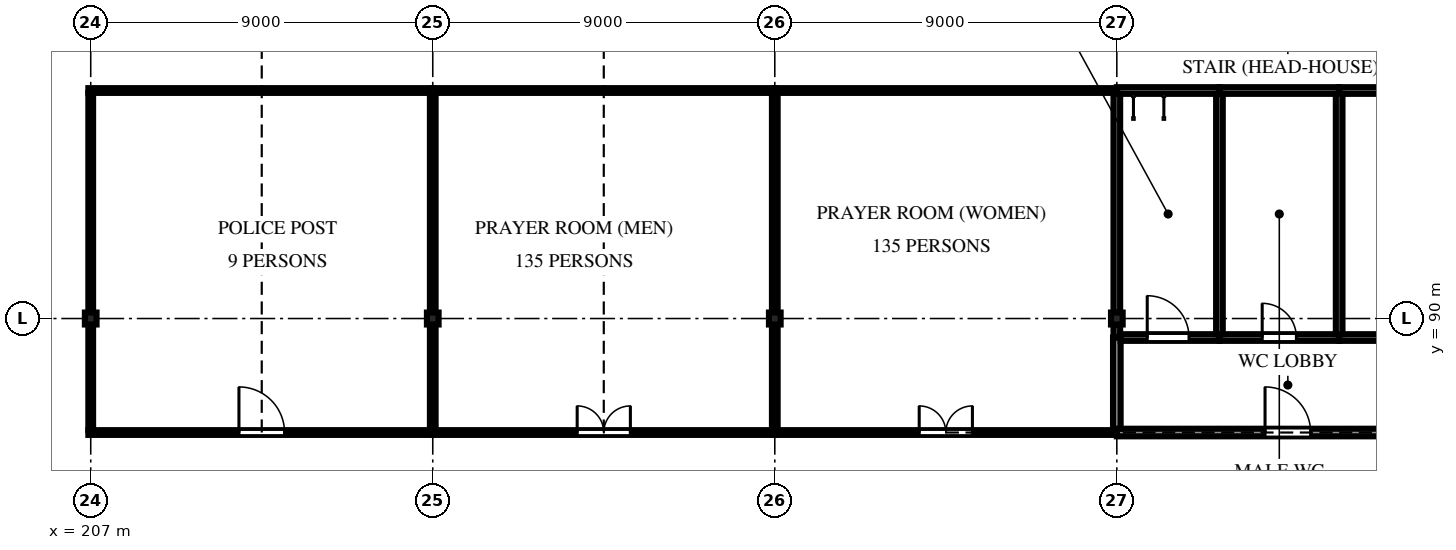
"""IFC4 building model, lengths in metres.
Left out: names, types, materials, properties, quantities, classifications, styles, units other than length and angle.
Written with IfcOpenShell. Run it as: python <this file> out.ifc"""

import sys

from ifc_helpers import new_model, si_unit, direction, frame, frame_2d, origin, origin_2d, place, context, subcontext, project, spatial, polyline, rectangle, i_section, outline, extrude, element, fill, save


model = new_model("IFC4")
c1 = context("Model", 3, precision=1e-05, world=origin(), true_north=direction((0.0, 1.0)))
c2 = subcontext(c1, "Body", "Model", "MODEL_VIEW")
j1 = project(units=[si_unit("LENGTHUNIT", "METRE"), si_unit("PLANEANGLEUNIT", "RADIAN")], contexts=[c1])
p1 = place(None, origin())
s1 = spatial("IfcSite", under=j1, at=p1, CompositionType="ELEMENT")
p2 = place(p1, origin())
s2 = spatial("IfcBuilding", under=s1, at=p2, CompositionType="ELEMENT")
p3 = place(p2, origin())
s3 = spatial("IfcBuildingStorey", under=s2, at=p3, CompositionType="ELEMENT", Elevation=0.0)
for number, where, z_axis, x_axis in (
    (1, (207.0, 90.0, -2.1), (0.0, 0.0, 1.0), (1.0, 0.0, 0.0)),
    (2, (216.0, 90.0, -2.1), (0.0, 0.0, 1.0), (1.0, 0.0, 0.0)),
    (3, (225.0, 90.0, -2.1), (0.0, 0.0, 1.0), (1.0, 0.0, 0.0)),
    (4, (234.0, 90.0, -2.1), (0.0, 0.0, 1.0), (1.0, 0.0, 0.0)),
):
    element("IfcColumn", number, at=place(p3, frame(where, z_axis=z_axis, x_axis=x_axis)), inside=s3, PredefinedType="COLUMN", context=c2, shape_type="SweptSolid", body=[
        extrude(i_section(OverallWidth=0.307, OverallDepth=0.314, WebThickness=0.012, FlangeThickness=0.019, FilletRadius=0.015, at=origin_2d()), origin(), (0.0, 0.0, 1.0), 9.6),
    ])
for number, where, z_axis, x_axis in (
    (5, (234.0, 96.0, 0.0), (0.0, 0.0, 1.0), (-1.0, 0.0, 0.0)),
    (6, (225.0, 96.0, 0.0), (0.0, 0.0, 1.0), (-1.0, 0.0, 0.0)),
):
    element("IfcWall", number, at=place(p3, frame(where, z_axis=z_axis, x_axis=x_axis)), inside=s3, PredefinedType="PARTITIONING", context=c2, shape_type="SweptSolid", body=[
        extrude(rectangle(XDim=9.0, YDim=0.125, at=frame_2d((4.5, 0.0))), origin(), (0.0, 0.0, 1.0), 6.757),
    ])
p4 = place(p3, frame((216.0, 96.0, 0.0), z_axis=(0.0, 0.0, 1.0), x_axis=(-1.0, 0.0, 0.0)))
e7 = element("IfcWall", 7, at=p4, inside=s3, PredefinedType="PARTITIONING", context=c2, shape_type="SweptSolid", body=[
    extrude(rectangle(XDim=9.062, YDim=0.125, at=frame_2d((4.531, 0.0))), origin(), (0.0, 0.0, 1.0), 6.757),
])
p5 = place(p3, frame((242.858, 96.0, 0.0), z_axis=(0.0, 0.0, 1.0), x_axis=(-1.0, 0.0, 0.0)))
e8 = element("IfcWall", 8, at=p5, inside=s3, PredefinedType="PARTITIONING", context=c2, shape_type="SweptSolid", body=[
    extrude(rectangle(XDim=3.008, YDim=0.175, at=frame_2d((1.504, 0.0))), origin(), (0.0, 0.0, 1.0), 6.459),
])
p6 = place(p3, frame((239.85, 96.0, 0.0), z_axis=(0.0, 0.0, 1.0), x_axis=(-1.0, 0.0, 0.0)))
e9 = element("IfcWall", 9, at=p6, inside=s3, PredefinedType="PARTITIONING", context=c2, shape_type="SweptSolid", body=[
    extrude(rectangle(XDim=3.15, YDim=0.175, at=frame_2d((1.575, 0.0))), origin(), (0.0, 0.0, 1.0), 6.459),
])
p7 = place(p3, frame((236.7, 96.0, 0.0), z_axis=(0.0, 0.0, 1.0), x_axis=(-1.0, 0.0, 0.0)))
e10 = element("IfcWall", 10, at=p7, inside=s3, PredefinedType="PARTITIONING", context=c2, shape_type="SweptSolid", body=[
    extrude(rectangle(XDim=2.7, YDim=0.175, at=frame_2d((1.35, 0.0))), origin(), (0.0, 0.0, 1.0), 6.459),
])
p8 = place(p3, frame((234.0, 87.0, 0.0), z_axis=(0.0, 0.0, 1.0), x_axis=(1.0, 0.0, 0.0)))
e11 = element("IfcWall", 11, at=p8, inside=s3, PredefinedType="PARTITIONING", context=c2, shape_type="SweptSolid", body=[
    extrude(rectangle(XDim=8.858, YDim=0.2, at=frame_2d((4.429, 0.0))), origin(), (0.0, 0.0, 1.0), 6.6),
])
p9 = place(p8, frame((3.9, 0.0, 0.0)))
e12 = element("IfcOpeningElement", 12, at=p9, cuts=e11, PredefinedType="OPENING", context=c2, shape_type="SweptSolid", body=[
    extrude(rectangle(XDim=1.2, YDim=2.1, at=frame_2d((0.6, 1.05))), frame((0.0, 0.11, 0.0), z_axis=(0.0, -1.0, 0.0), x_axis=(1.0, 0.0, 0.0)), (0.0, 0.0, 1.0), 0.22),
])
p10 = place(p3, frame((225.0, 87.0, 0.0), z_axis=(0.0, 0.0, 1.0), x_axis=(1.0, 0.0, 0.0)))
e13 = element("IfcWall", 13, at=p10, inside=s3, PredefinedType="PARTITIONING", context=c2, shape_type="SweptSolid", body=[
    extrude(rectangle(XDim=9.0, YDim=0.125, at=frame_2d((4.5, 0.0))), origin(), (0.0, 0.0, 1.0), 6.757),
])
p11 = place(p10, frame((3.8, 0.0, 0.0)))
e14 = element("IfcOpeningElement", 14, at=p11, cuts=e13, PredefinedType="OPENING", context=c2, shape_type="SweptSolid", body=[
    extrude(rectangle(XDim=1.4, YDim=2.1, at=frame_2d((0.7, 1.05))), frame((0.0, 0.073, 0.0), z_axis=(0.0, -1.0, 0.0), x_axis=(1.0, 0.0, 0.0)), (0.0, 0.0, 1.0), 0.145),
])
p12 = place(p3, frame((216.0, 87.0, 0.0), z_axis=(0.0, 0.0, 1.0), x_axis=(1.0, 0.0, 0.0)))
e15 = element("IfcWall", 15, at=p12, inside=s3, PredefinedType="PARTITIONING", context=c2, shape_type="SweptSolid", body=[
    extrude(rectangle(XDim=9.0, YDim=0.125, at=frame_2d((4.5, 0.0))), origin(), (0.0, 0.0, 1.0), 6.757),
])
p13 = place(p12, frame((3.8, 0.0, 0.0)))
e16 = element("IfcOpeningElement", 16, at=p13, cuts=e15, PredefinedType="OPENING", context=c2, shape_type="SweptSolid", body=[
    extrude(rectangle(XDim=1.4, YDim=2.1, at=frame_2d((0.7, 1.05))), frame((0.0, 0.073, 0.0), z_axis=(0.0, -1.0, 0.0), x_axis=(1.0, 0.0, 0.0)), (0.0, 0.0, 1.0), 0.145),
])
p14 = place(p3, frame((206.938, 87.0, 0.0), z_axis=(0.0, 0.0, 1.0), x_axis=(1.0, 0.0, 0.0)))
e17 = element("IfcWall", 17, at=p14, inside=s3, PredefinedType="PARTITIONING", context=c2, shape_type="SweptSolid", body=[
    extrude(rectangle(XDim=9.062, YDim=0.125, at=frame_2d((4.531, 0.0))), origin(), (0.0, 0.0, 1.0), 6.757),
])
p15 = place(p14, frame((3.962, 0.0, 0.0)))
e18 = element("IfcOpeningElement", 18, at=p15, cuts=e17, PredefinedType="OPENING", context=c2, shape_type="SweptSolid", body=[
    extrude(rectangle(XDim=1.2, YDim=2.1, at=frame_2d((0.6, 1.05))), frame((0.0, 0.073, 0.0), z_axis=(0.0, -1.0, 0.0), x_axis=(1.0, 0.0, 0.0)), (0.0, 0.0, 1.0), 0.145),
])
p16 = place(p3, frame((207.0, 95.938, 0.0), z_axis=(0.0, 0.0, 1.0), x_axis=(0.0, -1.0, 0.0)))
e19 = element("IfcWall", 19, at=p16, inside=s3, PredefinedType="PARTITIONING", context=c2, shape_type="SweptSolid", body=[
    extrude(rectangle(XDim=5.78, YDim=0.125, at=frame_2d((2.89, 0.0))), origin(), (0.0, 0.0, 1.0), 6.757),
])
p17 = place(p3, frame((207.0, 89.843, 0.0), z_axis=(0.0, 0.0, 1.0), x_axis=(0.0, -1.0, 0.0)))
e20 = element("IfcWall", 20, at=p17, inside=s3, PredefinedType="PARTITIONING", context=c2, shape_type="SweptSolid", body=[
    extrude(rectangle(XDim=2.78, YDim=0.125, at=frame_2d((1.39, 0.0))), origin(), (0.0, 0.0, 1.0), 6.757),
])
p18 = place(p3, frame((216.0, 95.938, 0.0), z_axis=(0.0, 0.0, 1.0), x_axis=(0.0, -1.0, 0.0)))
e21 = element("IfcWall", 21, at=p18, inside=s3, PredefinedType="PARTITIONING", context=c2, shape_type="SweptSolid", body=[
    extrude(rectangle(XDim=5.78, YDim=0.15, at=frame_2d((2.89, 0.0))), origin(), (0.0, 0.0, 1.0), 6.6),
])
p19 = place(p3, frame((216.0, 89.843, 0.0), z_axis=(0.0, 0.0, 1.0), x_axis=(0.0, -1.0, 0.0)))
e22 = element("IfcWall", 22, at=p19, inside=s3, PredefinedType="PARTITIONING", context=c2, shape_type="SweptSolid", body=[
    extrude(rectangle(XDim=2.78, YDim=0.15, at=frame_2d((1.39, 0.0))), origin(), (0.0, 0.0, 1.0), 6.6),
])
p20 = place(p3, frame((225.0, 95.938, 0.0), z_axis=(0.0, 0.0, 1.0), x_axis=(0.0, -1.0, 0.0)))
e23 = element("IfcWall", 23, at=p20, inside=s3, PredefinedType="PARTITIONING", context=c2, shape_type="SweptSolid", body=[
    extrude(rectangle(XDim=5.78, YDim=0.15, at=frame_2d((2.89, 0.0))), origin(), (0.0, 0.0, 1.0), 6.6),
])
p21 = place(p3, frame((225.0, 89.843, 0.0), z_axis=(0.0, 0.0, 1.0), x_axis=(0.0, -1.0, 0.0)))
e24 = element("IfcWall", 24, at=p21, inside=s3, PredefinedType="PARTITIONING", context=c2, shape_type="SweptSolid", body=[
    extrude(rectangle(XDim=2.78, YDim=0.15, at=frame_2d((1.39, 0.0))), origin(), (0.0, 0.0, 1.0), 6.6),
])
p22 = place(p3, frame((234.0, 89.5, 0.0), z_axis=(0.0, 0.0, 1.0), x_axis=(0.0, -1.0, 0.0)))
e25 = element("IfcWall", 25, at=p22, inside=s3, PredefinedType="PARTITIONING", context=c2, shape_type="SweptSolid", body=[
    extrude(rectangle(XDim=2.4, YDim=0.2, at=frame_2d((1.2, 0.0))), origin(), (0.0, 0.0, 1.0), 6.6),
])
p23 = place(p3, frame((234.0, 95.913, 0.0), z_axis=(0.0, 0.0, 1.0), x_axis=(0.0, -1.0, 0.0)))
e26 = element("IfcWall", 26, at=p23, inside=s3, PredefinedType="PARTITIONING", context=c2, shape_type="SweptSolid", body=[
    extrude(rectangle(XDim=5.755, YDim=0.175, at=frame_2d((2.878, 0.0))), origin(), (0.0, 0.0, 1.0), 6.459),
])
p24 = place(p3, frame((234.0, 89.843, 0.0), z_axis=(0.0, 0.0, 1.0), x_axis=(0.0, -1.0, 0.0)))
e27 = element("IfcWall", 27, at=p24, inside=s3, PredefinedType="PARTITIONING", context=c2, shape_type="SweptSolid", body=[
    extrude(rectangle(XDim=0.343, YDim=0.175, at=frame_2d((0.171, 0.0))), origin(), (0.0, 0.0, 1.0), 6.459),
])
p25 = place(p3, frame((239.85, 89.5, 0.0), z_axis=(0.0, 0.0, 1.0), x_axis=(1.0, 0.0, 0.0)))
e28 = element("IfcWall", 28, at=p25, inside=s3, PredefinedType="PARTITIONING", context=c2, shape_type="SweptSolid", body=[
    extrude(rectangle(XDim=3.008, YDim=0.175, at=frame_2d((1.504, 0.0))), origin(), (0.0, 0.0, 1.0), 6.459),
])
p26 = place(p25, frame((1.125, 0.0, 0.0)))
e29 = element("IfcOpeningElement", 29, at=p26, cuts=e28, PredefinedType="OPENING", context=c2, shape_type="SweptSolid", body=[
    extrude(rectangle(XDim=0.9, YDim=2.1, at=frame_2d((0.45, 1.05))), frame((0.0, 0.097, 0.0), z_axis=(0.0, -1.0, 0.0), x_axis=(1.0, 0.0, 0.0)), (0.0, 0.0, 1.0), 0.195),
])
p27 = place(p3, frame((236.7, 89.5, 0.0), z_axis=(0.0, 0.0, 1.0), x_axis=(1.0, 0.0, 0.0)))
e30 = element("IfcWall", 30, at=p27, inside=s3, PredefinedType="PARTITIONING", context=c2, shape_type="SweptSolid", body=[
    extrude(rectangle(XDim=3.15, YDim=0.175, at=frame_2d((1.575, 0.0))), origin(), (0.0, 0.0, 1.0), 6.459),
])
p28 = place(p27, frame((1.125, 0.0, 0.0)))
e31 = element("IfcOpeningElement", 31, at=p28, cuts=e30, PredefinedType="OPENING", context=c2, shape_type="SweptSolid", body=[
    extrude(rectangle(XDim=0.9, YDim=2.1, at=frame_2d((0.45, 1.05))), frame((0.0, 0.097, 0.0), z_axis=(0.0, -1.0, 0.0), x_axis=(1.0, 0.0, 0.0)), (0.0, 0.0, 1.0), 0.195),
])
p29 = place(p3, frame((234.1, 89.5, 0.0), z_axis=(0.0, 0.0, 1.0), x_axis=(1.0, 0.0, 0.0)))
e32 = element("IfcWall", 32, at=p29, inside=s3, PredefinedType="PARTITIONING", context=c2, shape_type="SweptSolid", body=[
    extrude(rectangle(XDim=2.6, YDim=0.175, at=frame_2d((1.3, 0.0))), origin(), (0.0, 0.0, 1.0), 6.459),
])
p30 = place(p29, frame((0.7, 0.0, 0.0)))
e33 = element("IfcOpeningElement", 33, at=p30, cuts=e32, PredefinedType="OPENING", context=c2, shape_type="SweptSolid", body=[
    extrude(rectangle(XDim=1.1, YDim=2.1, at=frame_2d((0.55, 1.05))), frame((0.0, 0.097, 0.0), z_axis=(0.0, -1.0, 0.0), x_axis=(1.0, 0.0, 0.0)), (0.0, 0.0, 1.0), 0.195),
])
for number, where, z_axis, x_axis in (
    (34, (236.7, 95.913, 0.0), (0.0, 0.0, 1.0), (0.0, -1.0, 0.0)),
    (35, (239.85, 95.913, 0.0), (0.0, 0.0, 1.0), (0.0, -1.0, 0.0)),
):
    element("IfcWall", number, at=place(p3, frame(where, z_axis=z_axis, x_axis=x_axis)), inside=s3, PredefinedType="PARTITIONING", context=c2, shape_type="SweptSolid", body=[
        extrude(rectangle(XDim=6.325, YDim=0.175, at=frame_2d((3.163, 0.0))), origin(), (0.0, 0.0, 1.0), 6.459),
    ])
p31 = place(p15, origin())
e36 = element("IfcDoor", 36, at=p31, inside=s3, OperationType="DOUBLE_DOOR_SINGLE_SWING", PredefinedType="DOOR", context=c2, shape_type="SweptSolid", body=[
    extrude(outline(polyline([(0.0, 0.0), (0.07, 0.0), (0.07, 2.03), (1.13, 2.03), (1.13, 0.0), (1.2, 0.0), (1.2, 2.1), (0.0, 2.1), (0.0, 0.0)])), frame((0.0, 0.025, 0.0), z_axis=(0.0, -1.0, 0.0), x_axis=(1.0, 0.0, 0.0)), (0.0, 0.0, 1.0), 0.05),
    extrude(outline(polyline([(0.074, 0.01), (0.597, 0.01), (0.597, 2.026), (0.074, 2.026), (0.074, 0.01)]), holes=[polyline([(0.178, 0.373), (0.492, 0.373), (0.492, 1.784), (0.178, 1.784), (0.178, 0.373)])]), frame((0.0, 0.017, 0.0), z_axis=(0.0, -1.0, 0.0), x_axis=(1.0, 0.0, 0.0)), (0.0, 0.0, 1.0), 0.035),
    extrude(rectangle(XDim=0.314, YDim=1.411, at=frame_2d((0.335, 1.079))), frame((0.0, 0.009, 0.0), z_axis=(0.0, -1.0, 0.0), x_axis=(1.0, 0.0, 0.0)), (0.0, 0.0, 1.0), 0.017),
    extrude(outline(polyline([(0.603, 0.01), (1.126, 0.01), (1.126, 2.026), (0.603, 2.026), (0.603, 0.01)]), holes=[polyline([(0.708, 0.373), (1.021, 0.373), (1.021, 1.784), (0.708, 1.784), (0.708, 0.373)])]), frame((0.0, 0.017, 0.0), z_axis=(0.0, -1.0, 0.0), x_axis=(1.0, 0.0, 0.0)), (0.0, 0.0, 1.0), 0.035),
    extrude(rectangle(XDim=0.314, YDim=1.411, at=frame_2d((0.865, 1.079))), frame((0.0, 0.009, 0.0), z_axis=(0.0, -1.0, 0.0), x_axis=(1.0, 0.0, 0.0)), (0.0, 0.0, 1.0), 0.017),
])
fill(e18, e36)
p32 = place(p13, origin())
e37 = element("IfcDoor", 37, at=p32, inside=s3, OperationType="DOUBLE_DOOR_SINGLE_SWING", PredefinedType="DOOR", context=c2, shape_type="SweptSolid", body=[
    extrude(outline(polyline([(0.0, 0.0), (0.07, 0.0), (0.07, 2.03), (1.33, 2.03), (1.33, 0.0), (1.4, 0.0), (1.4, 2.1), (0.0, 2.1), (0.0, 0.0)])), frame((0.0, 0.025, 0.0), z_axis=(0.0, -1.0, 0.0), x_axis=(1.0, 0.0, 0.0)), (0.0, 0.0, 1.0), 0.05),
    extrude(outline(polyline([(0.074, 0.01), (0.697, 0.01), (0.697, 2.026), (0.074, 2.026), (0.074, 0.01)]), holes=[polyline([(0.194, 0.16), (0.577, 0.16), (0.577, 1.01), (0.194, 1.01), (0.194, 0.16)]), polyline([(0.235, 1.16), (0.535, 1.16), (0.535, 1.76), (0.235, 1.76), (0.235, 1.16)])]), frame((0.0, 0.017, 0.0), z_axis=(0.0, -1.0, 0.0), x_axis=(1.0, 0.0, 0.0)), (0.0, 0.0, 1.0), 0.035),
    extrude(rectangle(XDim=0.383, YDim=0.85, at=frame_2d((0.385, 0.585))), frame((0.0, 0.009, 0.0), z_axis=(0.0, -1.0, 0.0), x_axis=(1.0, 0.0, 0.0)), (0.0, 0.0, 1.0), 0.017),
    extrude(rectangle(XDim=0.3, YDim=0.6, at=frame_2d((0.385, 1.46))), frame((0.0, 0.006, 0.0), z_axis=(0.0, -1.0, 0.0), x_axis=(1.0, 0.0, 0.0)), (0.0, 0.0, 1.0), 0.012),
    extrude(outline(polyline([(0.703, 0.01), (1.326, 0.01), (1.326, 2.026), (0.703, 2.026), (0.703, 0.01)]), holes=[polyline([(0.823, 0.16), (1.206, 0.16), (1.206, 1.01), (0.823, 1.01), (0.823, 0.16)]), polyline([(0.865, 1.16), (1.165, 1.16), (1.165, 1.76), (0.865, 1.76), (0.865, 1.16)])]), frame((0.0, 0.017, 0.0), z_axis=(0.0, -1.0, 0.0), x_axis=(1.0, 0.0, 0.0)), (0.0, 0.0, 1.0), 0.035),
    extrude(rectangle(XDim=0.383, YDim=0.85, at=frame_2d((1.014, 0.585))), frame((0.0, 0.009, 0.0), z_axis=(0.0, -1.0, 0.0), x_axis=(1.0, 0.0, 0.0)), (0.0, 0.0, 1.0), 0.017),
    extrude(rectangle(XDim=0.3, YDim=0.6, at=frame_2d((1.015, 1.46))), frame((0.0, 0.006, 0.0), z_axis=(0.0, -1.0, 0.0), x_axis=(1.0, 0.0, 0.0)), (0.0, 0.0, 1.0), 0.012),
])
fill(e16, e37)
p33 = place(p11, origin())
e38 = element("IfcDoor", 38, at=p33, inside=s3, OperationType="DOUBLE_DOOR_SINGLE_SWING", PredefinedType="DOOR", context=c2, shape_type="SweptSolid", body=[
    extrude(outline(polyline([(0.0, 0.0), (0.07, 0.0), (0.07, 2.03), (1.33, 2.03), (1.33, 0.0), (1.4, 0.0), (1.4, 2.1), (0.0, 2.1), (0.0, 0.0)])), frame((0.0, 0.025, 0.0), z_axis=(0.0, -1.0, 0.0), x_axis=(1.0, 0.0, 0.0)), (0.0, 0.0, 1.0), 0.05),
    extrude(outline(polyline([(0.074, 0.01), (0.697, 0.01), (0.697, 2.026), (0.074, 2.026), (0.074, 0.01)]), holes=[polyline([(0.194, 0.16), (0.577, 0.16), (0.577, 1.01), (0.194, 1.01), (0.194, 0.16)]), polyline([(0.235, 1.16), (0.535, 1.16), (0.535, 1.76), (0.235, 1.76), (0.235, 1.16)])]), frame((0.0, 0.017, 0.0), z_axis=(0.0, -1.0, 0.0), x_axis=(1.0, 0.0, 0.0)), (0.0, 0.0, 1.0), 0.035),
    extrude(rectangle(XDim=0.383, YDim=0.85, at=frame_2d((0.385, 0.585))), frame((0.0, 0.009, 0.0), z_axis=(0.0, -1.0, 0.0), x_axis=(1.0, 0.0, 0.0)), (0.0, 0.0, 1.0), 0.017),
    extrude(rectangle(XDim=0.3, YDim=0.6, at=frame_2d((0.385, 1.46))), frame((0.0, 0.006, 0.0), z_axis=(0.0, -1.0, 0.0), x_axis=(1.0, 0.0, 0.0)), (0.0, 0.0, 1.0), 0.012),
    extrude(outline(polyline([(0.703, 0.01), (1.326, 0.01), (1.326, 2.026), (0.703, 2.026), (0.703, 0.01)]), holes=[polyline([(0.823, 0.16), (1.206, 0.16), (1.206, 1.01), (0.823, 1.01), (0.823, 0.16)]), polyline([(0.865, 1.16), (1.165, 1.16), (1.165, 1.76), (0.865, 1.76), (0.865, 1.16)])]), frame((0.0, 0.017, 0.0), z_axis=(0.0, -1.0, 0.0), x_axis=(1.0, 0.0, 0.0)), (0.0, 0.0, 1.0), 0.035),
    extrude(rectangle(XDim=0.383, YDim=0.85, at=frame_2d((1.014, 0.585))), frame((0.0, 0.009, 0.0), z_axis=(0.0, -1.0, 0.0), x_axis=(1.0, 0.0, 0.0)), (0.0, 0.0, 1.0), 0.017),
    extrude(rectangle(XDim=0.3, YDim=0.6, at=frame_2d((1.015, 1.46))), frame((0.0, 0.006, 0.0), z_axis=(0.0, -1.0, 0.0), x_axis=(1.0, 0.0, 0.0)), (0.0, 0.0, 1.0), 0.012),
])
fill(e14, e38)
p34 = place(p9, origin())
e39 = element("IfcDoor", 39, at=p34, inside=s3, OperationType="DOUBLE_DOOR_SINGLE_SWING", PredefinedType="DOOR", context=c2, shape_type="SweptSolid", body=[
    extrude(outline(polyline([(0.0, 0.0), (0.07, 0.0), (0.07, 2.03), (1.13, 2.03), (1.13, 0.0), (1.2, 0.0), (1.2, 2.1), (0.0, 2.1), (0.0, 0.0)])), frame((0.0, 0.025, 0.0), z_axis=(0.0, -1.0, 0.0), x_axis=(1.0, 0.0, 0.0)), (0.0, 0.0, 1.0), 0.05),
    extrude(outline(polyline([(0.074, 0.01), (0.597, 0.01), (0.597, 2.026), (0.074, 2.026), (0.074, 0.01)]), holes=[polyline([(0.178, 0.373), (0.492, 0.373), (0.492, 1.784), (0.178, 1.784), (0.178, 0.373)])]), frame((0.0, 0.017, 0.0), z_axis=(0.0, -1.0, 0.0), x_axis=(1.0, 0.0, 0.0)), (0.0, 0.0, 1.0), 0.035),
    extrude(rectangle(XDim=0.314, YDim=1.411, at=frame_2d((0.335, 1.079))), frame((0.0, 0.009, 0.0), z_axis=(0.0, -1.0, 0.0), x_axis=(1.0, 0.0, 0.0)), (0.0, 0.0, 1.0), 0.017),
    extrude(outline(polyline([(0.603, 0.01), (1.126, 0.01), (1.126, 2.026), (0.603, 2.026), (0.603, 0.01)]), holes=[polyline([(0.708, 0.373), (1.021, 0.373), (1.021, 1.784), (0.708, 1.784), (0.708, 0.373)])]), frame((0.0, 0.017, 0.0), z_axis=(0.0, -1.0, 0.0), x_axis=(1.0, 0.0, 0.0)), (0.0, 0.0, 1.0), 0.035),
    extrude(rectangle(XDim=0.314, YDim=1.411, at=frame_2d((0.865, 1.079))), frame((0.0, 0.009, 0.0), z_axis=(0.0, -1.0, 0.0), x_axis=(1.0, 0.0, 0.0)), (0.0, 0.0, 1.0), 0.017),
])
fill(e12, e39)
p35 = place(p30, origin())
e40 = element("IfcDoor", 40, at=p35, inside=s3, OperationType="SINGLE_SWING_LEFT", PredefinedType="DOOR", context=c2, shape_type="SweptSolid", body=[
    extrude(outline(polyline([(0.0, 0.0), (0.07, 0.0), (0.07, 2.03), (1.03, 2.03), (1.03, 0.0), (1.1, 0.0), (1.1, 2.1), (0.0, 2.1), (0.0, 0.0)])), frame((0.0, 0.025, 0.0), z_axis=(0.0, -1.0, 0.0), x_axis=(1.0, 0.0, 0.0)), (0.0, 0.0, 1.0), 0.05),
    extrude(outline(polyline([(0.074, 0.01), (1.026, 0.01), (1.026, 2.026), (0.074, 2.026), (0.074, 0.01)]), holes=[polyline([(0.194, 0.16), (0.906, 0.16), (0.906, 1.01), (0.194, 1.01), (0.194, 0.16)]), polyline([(0.4, 1.16), (0.7, 1.16), (0.7, 1.76), (0.4, 1.76), (0.4, 1.16)])]), frame((0.0, 0.017, 0.0), z_axis=(0.0, -1.0, 0.0), x_axis=(1.0, 0.0, 0.0)), (0.0, 0.0, 1.0), 0.035),
    extrude(rectangle(XDim=0.712, YDim=0.85, at=frame_2d((0.55, 0.585))), frame((0.0, 0.009, 0.0), z_axis=(0.0, -1.0, 0.0), x_axis=(1.0, 0.0, 0.0)), (0.0, 0.0, 1.0), 0.017),
    extrude(rectangle(XDim=0.3, YDim=0.6, at=frame_2d((0.55, 1.46))), frame((0.0, 0.006, 0.0), z_axis=(0.0, -1.0, 0.0), x_axis=(1.0, 0.0, 0.0)), (0.0, 0.0, 1.0), 0.012),
])
fill(e33, e40)
p36 = place(p28, origin())
e41 = element("IfcDoor", 41, at=p36, inside=s3, OperationType="SINGLE_SWING_LEFT", PredefinedType="DOOR", context=c2, shape_type="SweptSolid", body=[
    extrude(outline(polyline([(0.0, 0.0), (0.07, 0.0), (0.07, 2.03), (0.83, 2.03), (0.83, 0.0), (0.9, 0.0), (0.9, 2.1), (0.0, 2.1), (0.0, 0.0)])), frame((0.0, 0.025, 0.0), z_axis=(0.0, -1.0, 0.0), x_axis=(1.0, 0.0, 0.0)), (0.0, 0.0, 1.0), 0.05),
    extrude(outline(polyline([(0.074, 0.01), (0.826, 0.01), (0.826, 2.026), (0.074, 2.026), (0.074, 0.01)]), holes=[polyline([(0.194, 0.16), (0.706, 0.16), (0.706, 1.01), (0.194, 1.01), (0.194, 0.16)]), polyline([(0.3, 1.16), (0.6, 1.16), (0.6, 1.76), (0.3, 1.76), (0.3, 1.16)])]), frame((0.0, 0.017, 0.0), z_axis=(0.0, -1.0, 0.0), x_axis=(1.0, 0.0, 0.0)), (0.0, 0.0, 1.0), 0.035),
    extrude(rectangle(XDim=0.512, YDim=0.85, at=frame_2d((0.45, 0.585))), frame((0.0, 0.009, 0.0), z_axis=(0.0, -1.0, 0.0), x_axis=(1.0, 0.0, 0.0)), (0.0, 0.0, 1.0), 0.017),
    extrude(rectangle(XDim=0.3, YDim=0.6, at=frame_2d((0.45, 1.46))), frame((0.0, 0.006, 0.0), z_axis=(0.0, -1.0, 0.0), x_axis=(1.0, 0.0, 0.0)), (0.0, 0.0, 1.0), 0.012),
])
fill(e31, e41)
save(model, sys.argv[1])
